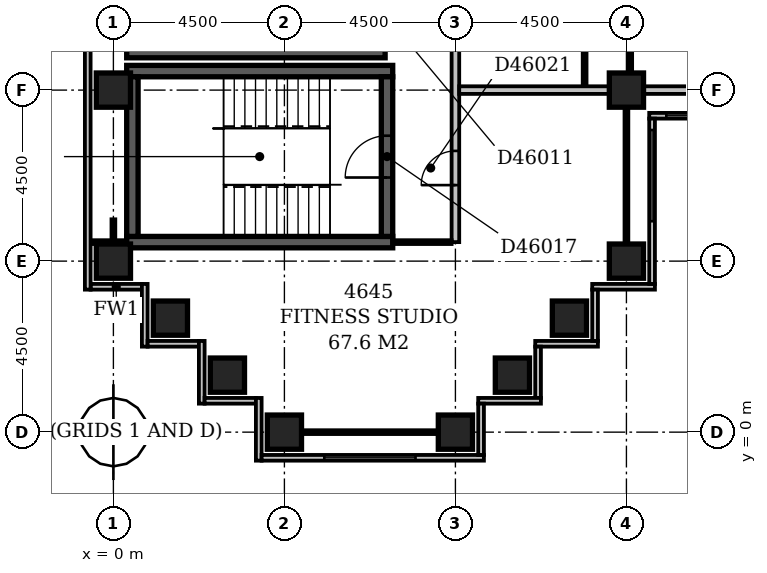
"""IFC4 building model, lengths in metres.
Left out: names, types, materials, properties, quantities, classifications, styles, units other than length and angle.
Written with IfcOpenShell. Run it as: python <this file> out.ifc"""

import sys

from ifc_helpers import new_model, si_unit, direction, frame, frame_2d, origin, origin_2d, place, context, subcontext, project, spatial, rectangle, extrude, element, fill, save


model = new_model("IFC4")
c1 = context("Model", 3, precision=1e-05, world=origin(), true_north=direction((0.0, 1.0)))
c2 = subcontext(c1, "Body", "Model", "MODEL_VIEW")
j1 = project(units=[si_unit("LENGTHUNIT", "METRE"), si_unit("PLANEANGLEUNIT", "RADIAN")], contexts=[c1])
p1 = place(None, origin())
s1 = spatial("IfcSite", under=j1, at=p1, CompositionType="ELEMENT")
p2 = place(p1, origin())
s2 = spatial("IfcBuilding", under=s1, at=p2, CompositionType="ELEMENT")
p3 = place(p2, frame((0.0, 0.0, 182.6)))
s3 = spatial("IfcBuildingStorey", under=s2, at=p3, CompositionType="ELEMENT", Elevation=182.6)
for number, where, z_axis, x_axis in (
    (1, (0.35, 5.0, -0.3), (0.0, 0.0, 1.0), (1.0, 0.0, 0.0)),
    (2, (0.35, 9.5, -0.3), (0.0, 0.0, 1.0), (1.0, 0.0, 0.0)),
):
    element("IfcWall", number, at=place(p3, frame(where, z_axis=z_axis, x_axis=x_axis)), inside=s3, PredefinedType="SHEAR", context=c2, shape_type="SweptSolid", body=[
        extrude(rectangle(XDim=7.0, YDim=0.3, at=frame_2d((3.5, 0.0))), origin(), (0.0, 0.0, 1.0), 3.55),
    ])
p4 = place(p3, frame((0.35, 10.0, -0.3), z_axis=(0.0, 0.0, 1.0), x_axis=(1.0, 0.0, 0.0)))
e3 = element("IfcWall", 3, at=p4, inside=s3, PredefinedType="SHEAR", context=c2, shape_type="SweptSolid", body=[
    extrude(rectangle(XDim=6.8, YDim=0.3, at=frame_2d((3.4, 0.0))), origin(), (0.0, 0.0, 1.0), 3.55),
])
p5 = place(p3, frame((0.5, 5.15, -0.3), z_axis=(0.0, 0.0, 1.0), x_axis=(0.0, 1.0, 0.0)))
e4 = element("IfcWall", 4, at=p5, inside=s3, PredefinedType="SHEAR", context=c2, shape_type="SweptSolid", body=[
    extrude(rectangle(XDim=4.2, YDim=0.3, at=frame_2d((2.1, 0.0))), origin(), (0.0, 0.0, 1.0), 3.55),
])
p6 = place(p3, frame((7.2, 5.15, -0.3), z_axis=(0.0, 0.0, 1.0), x_axis=(0.0, 1.0, 0.0)))
e5 = element("IfcWall", 5, at=p6, inside=s3, PredefinedType="SHEAR", context=c2, shape_type="SweptSolid", body=[
    extrude(rectangle(XDim=4.2, YDim=0.3, at=frame_2d((2.1, 0.0))), origin(), (0.0, 0.0, 1.0), 3.55),
])
p7 = place(p6, frame((1.55, 0.0, 0.3)))
e6 = element("IfcOpeningElement", 6, at=p7, cuts=e5, PredefinedType="OPENING", context=c2, shape_type="SweptSolid", body=[
    extrude(rectangle(XDim=1.1, YDim=2.1, at=frame_2d((0.55, 1.05))), frame((0.0, 0.162, 0.0), z_axis=(0.0, -1.0, 0.0), x_axis=(1.0, 0.0, 0.0)), (0.0, 0.0, 1.0), 0.324),
])
for number, where, z_axis, x_axis in (
    (7, (4.5, 0.0, -0.3), (0.0, 0.0, 1.0), (1.0, 0.0, 0.0)),
    (8, (9.0, 0.0, -0.3), (0.0, 0.0, 1.0), (1.0, 0.0, 0.0)),
    (9, (3.0, 1.5, -0.3), (0.0, 0.0, 1.0), (1.0, 0.0, 0.0)),
    (10, (10.5, 1.5, -0.3), (0.0, 0.0, 1.0), (1.0, 0.0, 0.0)),
    (11, (1.5, 3.0, -0.3), (0.0, 0.0, 1.0), (1.0, 0.0, 0.0)),
    (12, (12.0, 3.0, -0.3), (0.0, 0.0, 1.0), (1.0, 0.0, 0.0)),
    (13, (0.0, 4.5, -0.3), (0.0, 0.0, 1.0), (1.0, 0.0, 0.0)),
    (14, (13.5, 4.5, -0.3), (0.0, 0.0, 1.0), (1.0, 0.0, 0.0)),
    (15, (0.0, 9.0, -0.3), (0.0, 0.0, 1.0), (1.0, 0.0, 0.0)),
    (16, (13.5, 9.0, -0.3), (0.0, 0.0, 1.0), (1.0, 0.0, 0.0)),
):
    element("IfcColumn", number, at=place(p3, frame(where, z_axis=z_axis, x_axis=x_axis)), inside=s3, PredefinedType="COLUMN", context=c2, shape_type="SweptSolid", body=[
        extrude(rectangle(XDim=0.9, YDim=0.9, at=origin_2d()), origin(), (0.0, 0.0, 1.0), 3.55),
    ])
p8 = place(p3, frame((9.675, -0.6, 0.0), z_axis=(0.0, 0.0, 1.0), x_axis=(0.0, 1.0, 0.0)))
e17 = element("IfcWall", 17, at=p8, inside=s3, PredefinedType="STANDARD", context=c2, shape_type="SweptSolid", body=[
    extrude(rectangle(XDim=1.35, YDim=0.15, at=frame_2d((0.675, 0.0))), origin(), (0.0, 0.0, 1.0), 2.7),
])
p9 = place(p3, frame((9.6, 0.825, 0.0), z_axis=(0.0, 0.0, 1.0), x_axis=(1.0, 0.0, 0.0)))
e18 = element("IfcWall", 18, at=p9, inside=s3, PredefinedType="STANDARD", context=c2, shape_type="SweptSolid", body=[
    extrude(rectangle(XDim=1.65, YDim=0.15, at=frame_2d((0.825, 0.0))), origin(), (0.0, 0.0, 1.0), 2.7),
])
p10 = place(p3, frame((11.175, 0.9, 0.0), z_axis=(0.0, 0.0, 1.0), x_axis=(0.0, 1.0, 0.0)))
e19 = element("IfcWall", 19, at=p10, inside=s3, PredefinedType="STANDARD", context=c2, shape_type="SweptSolid", body=[
    extrude(rectangle(XDim=1.35, YDim=0.15, at=frame_2d((0.675, 0.0))), origin(), (0.0, 0.0, 1.0), 2.7),
])
p11 = place(p3, frame((11.1, 2.325, 0.0), z_axis=(0.0, 0.0, 1.0), x_axis=(1.0, 0.0, 0.0)))
e20 = element("IfcWall", 20, at=p11, inside=s3, PredefinedType="STANDARD", context=c2, shape_type="SweptSolid", body=[
    extrude(rectangle(XDim=1.65, YDim=0.15, at=frame_2d((0.825, 0.0))), origin(), (0.0, 0.0, 1.0), 2.7),
])
p12 = place(p3, frame((12.675, 2.4, 0.0), z_axis=(0.0, 0.0, 1.0), x_axis=(0.0, 1.0, 0.0)))
e21 = element("IfcWall", 21, at=p12, inside=s3, PredefinedType="STANDARD", context=c2, shape_type="SweptSolid", body=[
    extrude(rectangle(XDim=1.35, YDim=0.15, at=frame_2d((0.675, 0.0))), origin(), (0.0, 0.0, 1.0), 2.7),
])
p13 = place(p3, frame((12.6, 3.825, 0.0), z_axis=(0.0, 0.0, 1.0), x_axis=(1.0, 0.0, 0.0)))
e22 = element("IfcWall", 22, at=p13, inside=s3, PredefinedType="STANDARD", context=c2, shape_type="SweptSolid", body=[
    extrude(rectangle(XDim=1.65, YDim=0.15, at=frame_2d((0.825, 0.0))), origin(), (0.0, 0.0, 1.0), 2.7),
])
p14 = place(p3, frame((14.175, 3.9, 0.0), z_axis=(0.0, 0.0, 1.0), x_axis=(0.0, 1.0, 0.0)))
e23 = element("IfcWall", 23, at=p14, inside=s3, PredefinedType="STANDARD", context=c2, shape_type="SweptSolid", body=[
    extrude(rectangle(XDim=4.35, YDim=0.15, at=frame_2d((2.175, 0.0))), origin(), (0.0, 0.0, 1.0), 2.7),
])
p15 = place(p14, frame((1.65, 0.0, 0.6)))
e24 = element("IfcOpeningElement", 24, at=p15, cuts=e23, PredefinedType="OPENING", context=c2, shape_type="SweptSolid", body=[
    extrude(rectangle(XDim=2.4, YDim=1.8, at=frame_2d((1.2, 0.9))), frame((0.0, 0.087, 0.0), z_axis=(0.0, -1.0, 0.0), x_axis=(1.0, 0.0, 0.0)), (0.0, 0.0, 1.0), 0.174),
])
p16 = place(p3, frame((14.1, 8.325, 0.0), z_axis=(0.0, 0.0, 1.0), x_axis=(1.0, 0.0, 0.0)))
e25 = element("IfcWall", 25, at=p16, inside=s3, PredefinedType="STANDARD", context=c2, shape_type="SweptSolid", body=[
    extrude(rectangle(XDim=4.65, YDim=0.15, at=frame_2d((2.325, 0.0))), origin(), (0.0, 0.0, 1.0), 2.7),
])
p17 = place(p16, frame((0.45, 0.0, 0.6)))
e26 = element("IfcOpeningElement", 26, at=p17, cuts=e25, PredefinedType="OPENING", context=c2, shape_type="SweptSolid", body=[
    extrude(rectangle(XDim=2.4, YDim=1.8, at=frame_2d((1.2, 0.9))), frame((0.0, 0.087, 0.0), z_axis=(0.0, -1.0, 0.0), x_axis=(1.0, 0.0, 0.0)), (0.0, 0.0, 1.0), 0.174),
])
p18 = place(p3, frame((-0.675, 59.1, 0.0), z_axis=(0.0, 0.0, 1.0), x_axis=(0.0, -1.0, 0.0)))
e27 = element("IfcWall", 27, at=p18, inside=s3, PredefinedType="STANDARD", context=c2, shape_type="SweptSolid", body=[
    extrude(rectangle(XDim=55.35, YDim=0.15, at=frame_2d((27.675, 0.0))), origin(), (0.0, 0.0, 1.0), 2.7),
])
p19 = place(p3, frame((-0.6, 3.825, 0.0), z_axis=(0.0, 0.0, 1.0), x_axis=(1.0, 0.0, 0.0)))
e28 = element("IfcWall", 28, at=p19, inside=s3, PredefinedType="STANDARD", context=c2, shape_type="SweptSolid", body=[
    extrude(rectangle(XDim=1.35, YDim=0.15, at=frame_2d((0.675, 0.0))), origin(), (0.0, 0.0, 1.0), 2.7),
])
p20 = place(p3, frame((0.825, 3.9, 0.0), z_axis=(0.0, 0.0, 1.0), x_axis=(0.0, -1.0, 0.0)))
e29 = element("IfcWall", 29, at=p20, inside=s3, PredefinedType="STANDARD", context=c2, shape_type="SweptSolid", body=[
    extrude(rectangle(XDim=1.65, YDim=0.15, at=frame_2d((0.825, 0.0))), origin(), (0.0, 0.0, 1.0), 2.7),
])
p21 = place(p3, frame((0.9, 2.325, 0.0), z_axis=(0.0, 0.0, 1.0), x_axis=(1.0, 0.0, 0.0)))
e30 = element("IfcWall", 30, at=p21, inside=s3, PredefinedType="STANDARD", context=c2, shape_type="SweptSolid", body=[
    extrude(rectangle(XDim=1.35, YDim=0.15, at=frame_2d((0.675, 0.0))), origin(), (0.0, 0.0, 1.0), 2.7),
])
p22 = place(p3, frame((2.325, 2.4, 0.0), z_axis=(0.0, 0.0, 1.0), x_axis=(0.0, -1.0, 0.0)))
e31 = element("IfcWall", 31, at=p22, inside=s3, PredefinedType="STANDARD", context=c2, shape_type="SweptSolid", body=[
    extrude(rectangle(XDim=1.65, YDim=0.15, at=frame_2d((0.825, 0.0))), origin(), (0.0, 0.0, 1.0), 2.7),
])
p23 = place(p3, frame((2.4, 0.825, 0.0), z_axis=(0.0, 0.0, 1.0), x_axis=(1.0, 0.0, 0.0)))
e32 = element("IfcWall", 32, at=p23, inside=s3, PredefinedType="STANDARD", context=c2, shape_type="SweptSolid", body=[
    extrude(rectangle(XDim=1.35, YDim=0.15, at=frame_2d((0.675, 0.0))), origin(), (0.0, 0.0, 1.0), 2.7),
])
p24 = place(p3, frame((3.825, 0.9, 0.0), z_axis=(0.0, 0.0, 1.0), x_axis=(0.0, -1.0, 0.0)))
e33 = element("IfcWall", 33, at=p24, inside=s3, PredefinedType="STANDARD", context=c2, shape_type="SweptSolid", body=[
    extrude(rectangle(XDim=1.65, YDim=0.15, at=frame_2d((0.825, 0.0))), origin(), (0.0, 0.0, 1.0), 2.7),
])
p25 = place(p3, frame((3.9, -0.675, 0.0), z_axis=(0.0, 0.0, 1.0), x_axis=(1.0, 0.0, 0.0)))
e34 = element("IfcWall", 34, at=p25, inside=s3, PredefinedType="STANDARD", context=c2, shape_type="SweptSolid", body=[
    extrude(rectangle(XDim=5.85, YDim=0.15, at=frame_2d((2.925, 0.0))), origin(), (0.0, 0.0, 1.0), 2.7),
])
p26 = place(p25, frame((1.65, 0.0, 0.6)))
e35 = element("IfcOpeningElement", 35, at=p26, cuts=e34, PredefinedType="OPENING", context=c2, shape_type="SweptSolid", body=[
    extrude(rectangle(XDim=2.4, YDim=1.8, at=frame_2d((1.2, 0.9))), frame((0.0, 0.087, 0.0), z_axis=(0.0, -1.0, 0.0), x_axis=(1.0, 0.0, 0.0)), (0.0, 0.0, 1.0), 0.174),
])
p27 = place(p3, frame((4.95, 0.0, 0.0), z_axis=(0.0, 0.0, 1.0), x_axis=(1.0, 0.0, 0.0)))
e36 = element("IfcWall", 36, at=p27, inside=s3, PredefinedType="PARTITIONING", context=c2, shape_type="SweptSolid", body=[
    extrude(rectangle(XDim=3.6, YDim=0.1, at=frame_2d((1.8, 0.0))), origin(), (0.0, 0.0, 1.0), 2.7),
])
p28 = place(p3, frame((0.0, 4.95, 0.0), z_axis=(0.0, 0.0, 1.0), x_axis=(0.0, 1.0, 0.0)))
e37 = element("IfcWall", 37, at=p28, inside=s3, PredefinedType="PARTITIONING", context=c2, shape_type="SweptSolid", body=[
    extrude(rectangle(XDim=0.65, YDim=0.1, at=frame_2d((0.325, 0.0))), origin(), (0.0, 0.0, 1.0), 2.7),
])
p29 = place(p3, frame((13.5, 4.95, 0.0), z_axis=(0.0, 0.0, 1.0), x_axis=(0.0, 1.0, 0.0)))
e38 = element("IfcWall", 38, at=p29, inside=s3, PredefinedType="PARTITIONING", context=c2, shape_type="SweptSolid", body=[
    extrude(rectangle(XDim=3.6, YDim=0.1, at=frame_2d((1.8, 0.0))), origin(), (0.0, 0.0, 1.0), 2.7),
])
p30 = place(p3, frame((-0.6, 5.0, 0.0), z_axis=(0.0, 0.0, 1.0), x_axis=(1.0, 0.0, 0.0)))
e39 = element("IfcWall", 39, at=p30, inside=s3, PredefinedType="PARTITIONING", context=c2, shape_type="SweptSolid", body=[
    extrude(rectangle(XDim=0.951, YDim=0.1, at=frame_2d((0.476, 0.0))), origin(), (0.0, 0.0, 1.0), 3.25),
])
p31 = place(p3, frame((7.349, 5.0, 0.0), z_axis=(0.0, 0.0, 1.0), x_axis=(1.0, 0.0, 0.0)))
e40 = element("IfcWall", 40, at=p31, inside=s3, PredefinedType="PARTITIONING", context=c2, shape_type="SweptSolid", body=[
    extrude(rectangle(XDim=1.551, YDim=0.1, at=frame_2d((0.775, 0.0))), origin(), (0.0, 0.0, 1.0), 3.25),
])
p32 = place(p3, frame((9.0, 5.0, 0.0), z_axis=(0.0, 0.0, 1.0), x_axis=(0.0, 1.0, 0.0)))
e41 = element("IfcWall", 41, at=p32, inside=s3, PredefinedType="PARTITIONING", context=c2, shape_type="SweptSolid", body=[
    extrude(rectangle(XDim=31.0, YDim=0.2, at=frame_2d((15.5, 0.0))), origin(), (0.0, 0.0, 1.0), 3.25),
])
p33 = place(p32, frame((17.8, 0.0, 0.0)))
e42 = element("IfcOpeningElement", 42, at=p33, cuts=e41, PredefinedType="OPENING", context=c2, shape_type="SweptSolid", body=[
    extrude(rectangle(XDim=1.0, YDim=2.1, at=frame_2d((0.5, 1.05))), frame((0.0, 0.112, 0.0), z_axis=(0.0, -1.0, 0.0), x_axis=(1.0, 0.0, 0.0)), (0.0, 0.0, 1.0), 0.224),
])
p34 = place(p32, frame((14.95, 0.0, 0.0)))
e43 = element("IfcOpeningElement", 43, at=p34, cuts=e41, PredefinedType="OPENING", context=c2, shape_type="SweptSolid", body=[
    extrude(rectangle(XDim=1.0, YDim=2.1, at=frame_2d((0.5, 1.05))), frame((0.0, 0.112, 0.0), z_axis=(0.0, -1.0, 0.0), x_axis=(1.0, 0.0, 0.0)), (0.0, 0.0, 1.0), 0.224),
])
p35 = place(p32, frame((9.3, 0.0, 0.0)))
e44 = element("IfcOpeningElement", 44, at=p35, cuts=e41, PredefinedType="OPENING", context=c2, shape_type="SweptSolid", body=[
    extrude(rectangle(XDim=1.0, YDim=2.1, at=frame_2d((0.5, 1.05))), frame((0.0, 0.112, 0.0), z_axis=(0.0, -1.0, 0.0), x_axis=(1.0, 0.0, 0.0)), (0.0, 0.0, 1.0), 0.224),
])
p36 = place(p32, frame((1.5, 0.0, 0.0)))
e45 = element("IfcOpeningElement", 45, at=p36, cuts=e41, PredefinedType="OPENING", context=c2, shape_type="SweptSolid", body=[
    extrude(rectangle(XDim=0.9, YDim=2.1, at=frame_2d((0.45, 1.05))), frame((0.0, 0.112, 0.0), z_axis=(0.0, -1.0, 0.0), x_axis=(1.0, 0.0, 0.0)), (0.0, 0.0, 1.0), 0.224),
])
p37 = place(p3, frame((9.1, 9.0, 0.0), z_axis=(0.0, 0.0, 1.0), x_axis=(1.0, 0.0, 0.0)))
e46 = element("IfcWall", 46, at=p37, inside=s3, PredefinedType="PARTITIONING", context=c2, shape_type="SweptSolid", body=[
    extrude(rectangle(XDim=3.95, YDim=0.2, at=frame_2d((1.975, 0.0))), origin(), (0.0, 0.0, 1.0), 3.25),
])
p38 = place(p3, frame((13.95, 9.0, 0.0), z_axis=(0.0, 0.0, 1.0), x_axis=(1.0, 0.0, 0.0)))
e47 = element("IfcWall", 47, at=p38, inside=s3, PredefinedType="PARTITIONING", context=c2, shape_type="SweptSolid", body=[
    extrude(rectangle(XDim=3.6, YDim=0.2, at=frame_2d((1.8, 0.0))), origin(), (0.0, 0.0, 1.0), 2.7),
])
p39 = place(p3, frame((12.4, 9.1, 0.0), z_axis=(0.0, 0.0, 1.0), x_axis=(0.0, 1.0, 0.0)))
e48 = element("IfcWall", 48, at=p39, inside=s3, PredefinedType="PARTITIONING", context=c2, shape_type="SweptSolid", body=[
    extrude(rectangle(XDim=4.9, YDim=0.1, at=frame_2d((2.45, 0.0))), origin(), (0.0, 0.0, 1.0), 3.25),
])
p40 = place(p39, frame((1.95, 0.0, 0.0)))
e49 = element("IfcOpeningElement", 49, at=p40, cuts=e48, PredefinedType="OPENING", context=c2, shape_type="SweptSolid", body=[
    extrude(rectangle(XDim=0.9, YDim=2.1, at=frame_2d((0.45, 1.05))), frame((0.0, 0.062, 0.0), z_axis=(0.0, -1.0, 0.0), x_axis=(1.0, 0.0, 0.0)), (0.0, 0.0, 1.0), 0.124),
])
p41 = place(p3, frame((13.6, 9.45, 0.0), z_axis=(0.0, 0.0, 1.0), x_axis=(0.0, 1.0, 0.0)))
e50 = element("IfcWall", 50, at=p41, inside=s3, PredefinedType="PARTITIONING", context=c2, shape_type="SweptSolid", body=[
    extrude(rectangle(XDim=8.45, YDim=0.1, at=frame_2d((4.225, 0.0))), origin(), (0.0, 0.0, 1.0), 3.25),
])
p42 = place(p41, frame((1.35, 0.0, 0.0)))
e51 = element("IfcOpeningElement", 51, at=p42, cuts=e50, PredefinedType="OPENING", context=c2, shape_type="SweptSolid", body=[
    extrude(rectangle(XDim=0.9, YDim=2.1, at=frame_2d((0.45, 1.05))), frame((0.0, 0.062, 0.0), z_axis=(0.0, -1.0, 0.0), x_axis=(1.0, 0.0, 0.0)), (0.0, 0.0, 1.0), 0.124),
])
p43 = place(p41, frame((5.85, 0.0, 0.0)))
e52 = element("IfcOpeningElement", 52, at=p43, cuts=e50, PredefinedType="OPENING", context=c2, shape_type="SweptSolid", body=[
    extrude(rectangle(XDim=0.9, YDim=2.1, at=frame_2d((0.45, 1.05))), frame((0.0, 0.062, 0.0), z_axis=(0.0, -1.0, 0.0), x_axis=(1.0, 0.0, 0.0)), (0.0, 0.0, 1.0), 0.124),
])
p44 = place(p15, origin())
e53 = element("IfcWindow", 53, at=p44, inside=s3, PartitioningType="SINGLE_PANEL", PredefinedType="WINDOW", context=c2, shape_type="SweptSolid", body=[
    extrude(rectangle(XDim=2.4, YDim=1.8, at=frame_2d((1.2, 0.9))), frame((0.0, 0.03, 0.0), z_axis=(0.0, -1.0, 0.0), x_axis=(1.0, 0.0, 0.0)), (0.0, 0.0, 1.0), 0.06),
])
fill(e24, e53)
p45 = place(p17, origin())
e54 = element("IfcWindow", 54, at=p45, inside=s3, PartitioningType="SINGLE_PANEL", PredefinedType="WINDOW", context=c2, shape_type="SweptSolid", body=[
    extrude(rectangle(XDim=2.4, YDim=1.8, at=frame_2d((1.2, 0.9))), frame((0.0, 0.03, 0.0), z_axis=(0.0, -1.0, 0.0), x_axis=(1.0, 0.0, 0.0)), (0.0, 0.0, 1.0), 0.06),
])
fill(e26, e54)
p46 = place(p26, origin())
e55 = element("IfcWindow", 55, at=p46, inside=s3, PartitioningType="SINGLE_PANEL", PredefinedType="WINDOW", context=c2, shape_type="SweptSolid", body=[
    extrude(rectangle(XDim=2.4, YDim=1.8, at=frame_2d((1.2, 0.9))), frame((0.0, 0.03, 0.0), z_axis=(0.0, -1.0, 0.0), x_axis=(1.0, 0.0, 0.0)), (0.0, 0.0, 1.0), 0.06),
])
fill(e35, e55)
p47 = place(p7, origin())
e56 = element("IfcDoor", 56, at=p47, inside=s3, OperationType="SINGLE_SWING_LEFT", PredefinedType="DOOR", context=c2, shape_type="SweptSolid", body=[
    extrude(rectangle(XDim=1.1, YDim=2.1, at=frame_2d((0.55, 1.05))), frame((0.0, 0.025, 0.0), z_axis=(0.0, -1.0, 0.0), x_axis=(1.0, 0.0, 0.0)), (0.0, 0.0, 1.0), 0.05),
])
fill(e6, e56)
p48 = place(p36, origin())
e57 = element("IfcDoor", 57, at=p48, inside=s3, OperationType="SINGLE_SWING_LEFT", PredefinedType="DOOR", context=c2, shape_type="SweptSolid", body=[
    extrude(rectangle(XDim=0.9, YDim=2.1, at=frame_2d((0.45, 1.05))), frame((0.0, 0.025, 0.0), z_axis=(0.0, -1.0, 0.0), x_axis=(1.0, 0.0, 0.0)), (0.0, 0.0, 1.0), 0.05),
])
fill(e45, e57)
save(model, sys.argv[1])
